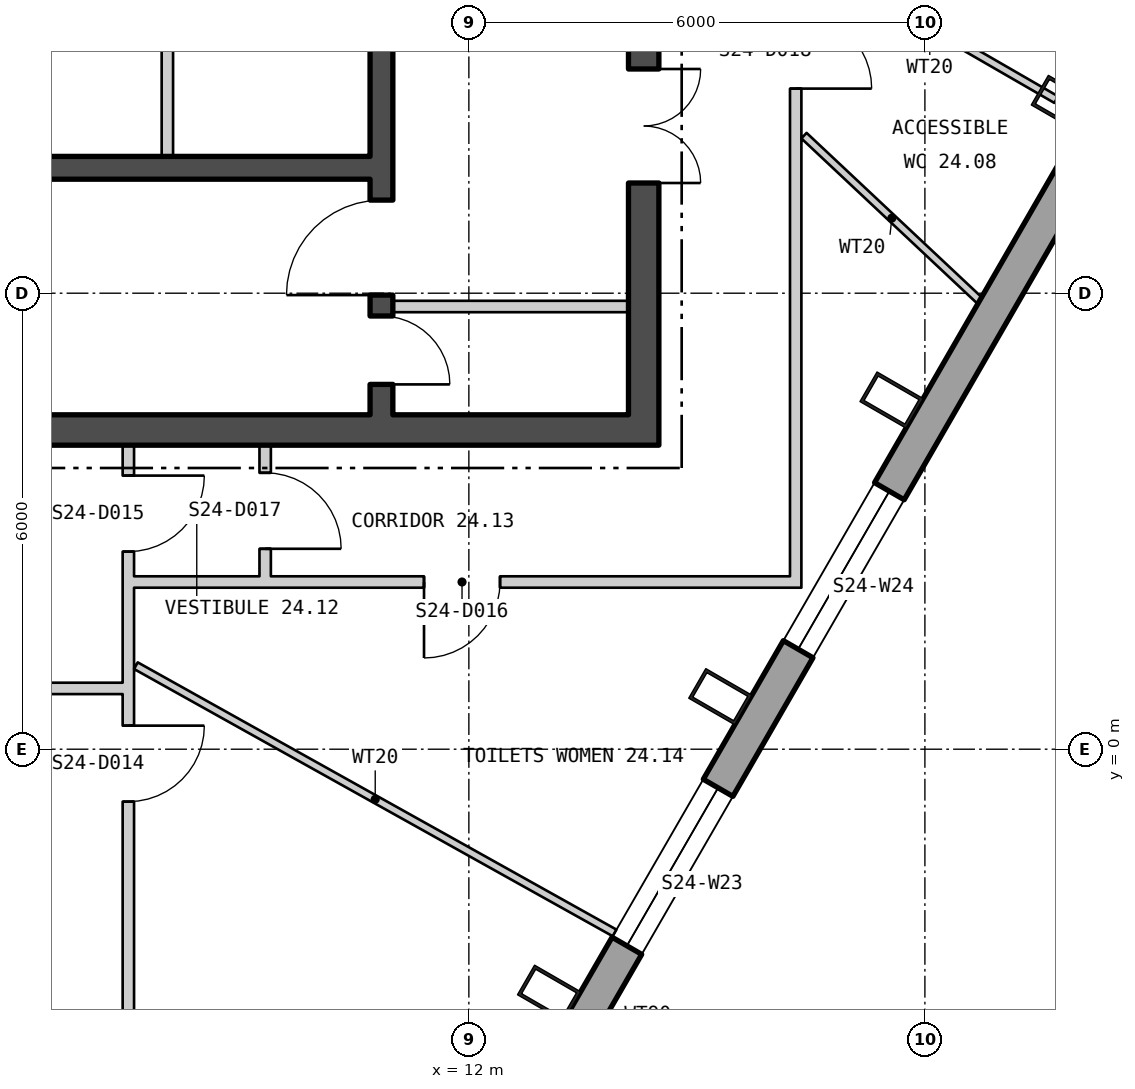
"""IFC4 building model, lengths in metres.
Left out: names, types, materials, properties, quantities, classifications, styles, units other than length and angle.
Written with IfcOpenShell. Run it as: python <this file> out.ifc"""

import sys

from ifc_helpers import new_model, si_unit, direction, frame, frame_2d, origin, origin_2d, place, context, subcontext, project, spatial, polyline, rectangle, hollow_rectangle, outline, extrude, element, fill, save


model = new_model("IFC4")
c1 = context("Model", 3, precision=1e-05, world=origin(), true_north=direction((0.0, 1.0)))
c2 = subcontext(c1, "Body", "Model", "MODEL_VIEW")
j1 = project(units=[si_unit("LENGTHUNIT", "METRE"), si_unit("PLANEANGLEUNIT", "RADIAN")], contexts=[c1])
p1 = place(None, origin())
s1 = spatial("IfcSite", under=j1, at=p1, CompositionType="ELEMENT")
p2 = place(p1, origin())
s2 = spatial("IfcBuilding", under=s1, at=p2, CompositionType="ELEMENT")
p3 = place(p2, frame((0.0, 0.0, 312.6)))
s3 = spatial("IfcBuildingStorey", under=s2, at=p3, CompositionType="ELEMENT", Elevation=312.6)
for number, where, z_axis, x_axis in (
    (1, (13.055, -3.211, 0.0), (0.0, 0.0, 1.0), (0.5, 0.866, 0.0)),
    (2, (15.308, 0.691, 0.0), (0.0, 0.0, 1.0), (0.5, 0.866, 0.0)),
    (3, (17.561, 4.594, 0.0), (0.0, 0.0, 1.0), (0.5, 0.866, 0.0)),
    (4, (19.815, 8.497, 0.0), (0.0, 0.0, 1.0), (0.5, 0.866, 0.0)),
):
    element("IfcColumn", number, at=place(p3, frame(where, z_axis=z_axis, x_axis=x_axis)), inside=s3, PredefinedType="COLUMN", context=c2, shape_type="SweptSolid", body=[
        extrude(hollow_rectangle(XDim=0.45, YDim=0.7, WallThickness=0.04, at=origin_2d()), origin(), (0.0, 0.0, 1.0), 4.2),
    ])
p4 = place(p3, frame((2.12, -23.301, -0.18), z_axis=(0.0, 0.0, 1.0), x_axis=(0.500000141277, 0.866025322218, 0.0)))
e5 = element("IfcWall", 5, at=p4, inside=s3, PredefinedType="SOLIDWALL", context=c2, shape_type="SweptSolid", body=[
    extrude(outline(polyline([(-0.13, -0.225), (45.86, -0.225), (45.6, 0.225), (0.13, 0.225), (-0.13, -0.225)])), origin(), (0.0, 0.0, 1.0), 3.98),
])
p5 = place(p4, frame((1.424, 0.0, 1.08)))
e6 = element("IfcOpeningElement", 6, at=p5, cuts=e5, PredefinedType="OPENING", context=c2, shape_type="SweptSolid", body=[
    extrude(rectangle(XDim=2.4, YDim=2.3, at=frame_2d((1.2, 1.15))), frame((0.0, 0.235, 0.0), z_axis=(0.0, -1.0, 0.0), x_axis=(1.0, 0.0, 0.0)), (0.0, 0.0, 1.0), 0.47),
])
p6 = place(p4, frame((5.892, 0.0, 1.08)))
e7 = element("IfcOpeningElement", 7, at=p6, cuts=e5, PredefinedType="OPENING", context=c2, shape_type="SweptSolid", body=[
    extrude(rectangle(XDim=2.4, YDim=2.3, at=frame_2d((1.2, 1.15))), frame((0.0, 0.235, 0.0), z_axis=(0.0, -1.0, 0.0), x_axis=(1.0, 0.0, 0.0)), (0.0, 0.0, 1.0), 0.47),
])
p7 = place(p4, frame((14.905, 0.0, 1.08)))
e8 = element("IfcOpeningElement", 8, at=p7, cuts=e5, PredefinedType="OPENING", context=c2, shape_type="SweptSolid", body=[
    extrude(rectangle(XDim=2.4, YDim=2.3, at=frame_2d((1.2, 1.15))), frame((0.0, 0.235, 0.0), z_axis=(0.0, -1.0, 0.0), x_axis=(1.0, 0.0, 0.0)), (0.0, 0.0, 1.0), 0.47),
])
p8 = place(p4, frame((19.412, 0.0, 1.08)))
e9 = element("IfcOpeningElement", 9, at=p8, cuts=e5, PredefinedType="OPENING", context=c2, shape_type="SweptSolid", body=[
    extrude(rectangle(XDim=2.4, YDim=2.3, at=frame_2d((1.2, 1.15))), frame((0.0, 0.235, 0.0), z_axis=(0.0, -1.0, 0.0), x_axis=(1.0, 0.0, 0.0)), (0.0, 0.0, 1.0), 0.47),
])
p9 = place(p4, frame((23.918, 0.0, 1.08)))
e10 = element("IfcOpeningElement", 10, at=p9, cuts=e5, PredefinedType="OPENING", context=c2, shape_type="SweptSolid", body=[
    extrude(rectangle(XDim=2.4, YDim=2.3, at=frame_2d((1.2, 1.15))), frame((0.0, 0.235, 0.0), z_axis=(0.0, -1.0, 0.0), x_axis=(1.0, 0.0, 0.0)), (0.0, 0.0, 1.0), 0.47),
])
p10 = place(p4, frame((28.425, 0.0, 1.08)))
e11 = element("IfcOpeningElement", 11, at=p10, cuts=e5, PredefinedType="OPENING", context=c2, shape_type="SweptSolid", body=[
    extrude(rectangle(XDim=2.4, YDim=2.3, at=frame_2d((1.2, 1.15))), frame((0.0, 0.235, 0.0), z_axis=(0.0, -1.0, 0.0), x_axis=(1.0, 0.0, 0.0)), (0.0, 0.0, 1.0), 0.47),
])
p11 = place(p4, frame((37.438, 0.0, 1.08)))
e12 = element("IfcOpeningElement", 12, at=p11, cuts=e5, PredefinedType="OPENING", context=c2, shape_type="SweptSolid", body=[
    extrude(rectangle(XDim=2.4, YDim=2.3, at=frame_2d((1.2, 1.15))), frame((0.0, 0.235, 0.0), z_axis=(0.0, -1.0, 0.0), x_axis=(1.0, 0.0, 0.0)), (0.0, 0.0, 1.0), 0.47),
])
p12 = place(p4, frame((41.907, 0.0, 1.08)))
e13 = element("IfcOpeningElement", 13, at=p12, cuts=e5, PredefinedType="OPENING", context=c2, shape_type="SweptSolid", body=[
    extrude(rectangle(XDim=2.4, YDim=2.3, at=frame_2d((1.2, 1.15))), frame((0.0, 0.235, 0.0), z_axis=(0.0, -1.0, 0.0), x_axis=(1.0, 0.0, 0.0)), (0.0, 0.0, 1.0), 0.47),
])
p13 = place(p3, frame((-14.5, 4.2, 0.0), z_axis=(0.0, 0.0, 1.0), x_axis=(1.0, 0.0, 0.0)))
e14 = element("IfcWall", 14, at=p13, inside=s3, PredefinedType="SHEAR", context=c2, shape_type="SweptSolid", body=[
    extrude(rectangle(XDim=29.0, YDim=0.4, at=frame_2d((14.5, 0.0))), origin(), (0.0, 0.0, 1.0), 4.0),
])
p14 = place(p13, frame((9.0, 0.0, 0.0)))
e15 = element("IfcOpeningElement", 15, at=p14, cuts=e14, PredefinedType="OPENING", context=c2, shape_type="SweptSolid", body=[
    extrude(rectangle(XDim=1.8, YDim=2.4, at=frame_2d((0.9, 1.2))), frame((0.0, 0.21, 0.0), z_axis=(0.0, -1.0, 0.0), x_axis=(1.0, 0.0, 0.0)), (0.0, 0.0, 1.0), 0.42),
])
p15 = place(p13, frame((19.0, 0.0, 0.0)))
e16 = element("IfcOpeningElement", 16, at=p15, cuts=e14, PredefinedType="OPENING", context=c2, shape_type="SweptSolid", body=[
    extrude(rectangle(XDim=1.8, YDim=2.4, at=frame_2d((0.9, 1.2))), frame((0.0, 0.21, 0.0), z_axis=(0.0, -1.0, 0.0), x_axis=(1.0, 0.0, 0.0)), (0.0, 0.0, 1.0), 0.42),
])
p16 = place(p3, frame((14.3, 4.4, 0.0), z_axis=(0.0, 0.0, 1.0), x_axis=(0.0, 1.0, 0.0)))
e17 = element("IfcWall", 17, at=p16, inside=s3, PredefinedType="SHEAR", context=c2, shape_type="SweptSolid", body=[
    extrude(rectangle(XDim=13.2, YDim=0.4, at=frame_2d((6.6, 0.0))), origin(), (0.0, 0.0, 1.0), 4.0),
])
p17 = place(p16, frame((3.05, 0.0, 0.0)))
e18 = element("IfcOpeningElement", 18, at=p17, cuts=e17, PredefinedType="OPENING", context=c2, shape_type="SweptSolid", body=[
    extrude(rectangle(XDim=1.5, YDim=2.1, at=frame_2d((0.75, 1.05))), frame((0.0, 0.21, 0.0), z_axis=(0.0, -1.0, 0.0), x_axis=(1.0, 0.0, 0.0)), (0.0, 0.0, 1.0), 0.42),
])
p18 = place(p3, frame((10.85, 4.4, 0.0), z_axis=(0.0, 0.0, 1.0), x_axis=(0.0, 1.0, 0.0)))
e19 = element("IfcWall", 19, at=p18, inside=s3, PredefinedType="SHEAR", context=c2, shape_type="SweptSolid", body=[
    extrude(rectangle(XDim=13.2, YDim=0.3, at=frame_2d((6.6, 0.0))), origin(), (0.0, 0.0, 1.0), 4.0),
])
p19 = place(p18, frame((1.575, 0.0, 0.0)))
e20 = element("IfcOpeningElement", 20, at=p19, cuts=e19, PredefinedType="OPENING", context=c2, shape_type="SweptSolid", body=[
    extrude(rectangle(XDim=1.25, YDim=2.1, at=frame_2d((0.625, 1.05))), frame((0.0, 0.16, 0.0), z_axis=(0.0, -1.0, 0.0), x_axis=(1.0, 0.0, 0.0)), (0.0, 0.0, 1.0), 0.32),
])
p20 = place(p18, frame((0.4, 0.0, 0.0)))
e21 = element("IfcOpeningElement", 21, at=p20, cuts=e19, PredefinedType="OPENING", context=c2, shape_type="SweptSolid", body=[
    extrude(rectangle(XDim=0.9, YDim=2.1, at=frame_2d((0.45, 1.05))), frame((0.0, 0.16, 0.0), z_axis=(0.0, -1.0, 0.0), x_axis=(1.0, 0.0, 0.0)), (0.0, 0.0, 1.0), 0.32),
])
p21 = place(p3, frame((2.6, 7.65, 0.0), z_axis=(0.0, 0.0, 1.0), x_axis=(1.0, 0.0, 0.0)))
e22 = element("IfcWall", 22, at=p21, inside=s3, PredefinedType="SHEAR", context=c2, shape_type="SweptSolid", body=[
    extrude(rectangle(XDim=8.1, YDim=0.3, at=frame_2d((4.05, 0.0))), origin(), (0.0, 0.0, 1.0), 4.0),
])
p22 = place(p3, frame((8.033, 7.8, 0.0), z_axis=(0.0, 0.0, 1.0), x_axis=(0.0, 1.0, 0.0)))
e23 = element("IfcWall", 23, at=p22, inside=s3, PredefinedType="PARTITIONING", context=c2, shape_type="SweptSolid", body=[
    extrude(rectangle(XDim=2.7, YDim=0.15, at=frame_2d((1.35, 0.0))), origin(), (0.0, 0.0, 1.0), 4.0),
])
p23 = place(p3, frame((11.0, 5.825, 0.0), z_axis=(0.0, 0.0, 1.0), x_axis=(1.0, 0.0, 0.0)))
e24 = element("IfcWall", 24, at=p23, inside=s3, PredefinedType="PARTITIONING", context=c2, shape_type="SweptSolid", body=[
    extrude(rectangle(XDim=3.1, YDim=0.15, at=frame_2d((1.55, 0.0))), origin(), (0.0, 0.0, 1.0), 4.0),
])
p24 = place(p3, frame((-7.52, 0.8, 0.0), z_axis=(0.0, 0.0, 1.0), x_axis=(1.0, 0.0, 0.0)))
e25 = element("IfcWall", 25, at=p24, inside=s3, PredefinedType="PARTITIONING", context=c2, shape_type="SweptSolid", body=[
    extrude(rectangle(XDim=14.965, YDim=0.15, at=frame_2d((7.482, 0.0))), origin(), (0.0, 0.0, 1.0), 4.0),
])
p25 = place(p24, frame((1.206, 0.0, 0.0)))
e26 = element("IfcOpeningElement", 26, at=p25, cuts=e25, PredefinedType="OPENING", context=c2, shape_type="SweptSolid", body=[
    extrude(rectangle(XDim=1.0, YDim=2.1, at=frame_2d((0.5, 1.05))), frame((0.0, 0.085, 0.0), z_axis=(0.0, -1.0, 0.0), x_axis=(1.0, 0.0, 0.0)), (0.0, 0.0, 1.0), 0.17),
])
p26 = place(p24, frame((12.796, 0.0, 0.0)))
e27 = element("IfcOpeningElement", 27, at=p26, cuts=e25, PredefinedType="OPENING", context=c2, shape_type="SweptSolid", body=[
    extrude(rectangle(XDim=1.0, YDim=2.1, at=frame_2d((0.5, 1.05))), frame((0.0, 0.085, 0.0), z_axis=(0.0, -1.0, 0.0), x_axis=(1.0, 0.0, 0.0)), (0.0, 0.0, 1.0), 0.17),
])
p27 = place(p3, frame((7.52, -13.498, 0.0), z_axis=(0.0, 0.0, 1.0), x_axis=(0.0, 1.0, 0.0)))
e28 = element("IfcWall", 28, at=p27, inside=s3, PredefinedType="PARTITIONING", context=c2, shape_type="SweptSolid", body=[
    extrude(rectangle(XDim=17.498, YDim=0.15, at=frame_2d((8.749, 0.0))), origin(), (0.0, 0.0, 1.0), 4.0),
])
p28 = place(p27, frame((3.639, 0.0, 0.0)))
e29 = element("IfcOpeningElement", 29, at=p28, cuts=e28, PredefinedType="OPENING", context=c2, shape_type="SweptSolid", body=[
    extrude(rectangle(XDim=1.0, YDim=2.1, at=frame_2d((0.5, 1.05))), frame((0.0, 0.085, 0.0), z_axis=(0.0, -1.0, 0.0), x_axis=(1.0, 0.0, 0.0)), (0.0, 0.0, 1.0), 0.17),
])
p29 = place(p27, frame((12.808, 0.0, 0.0)))
e30 = element("IfcOpeningElement", 30, at=p29, cuts=e28, PredefinedType="OPENING", context=c2, shape_type="SweptSolid", body=[
    extrude(rectangle(XDim=1.0, YDim=2.1, at=frame_2d((0.5, 1.05))), frame((0.0, 0.085, 0.0), z_axis=(0.0, -1.0, 0.0), x_axis=(1.0, 0.0, 0.0)), (0.0, 0.0, 1.0), 0.17),
])
p30 = place(p27, frame((16.098, 0.0, 0.0)))
e31 = element("IfcOpeningElement", 31, at=p30, cuts=e28, PredefinedType="OPENING", context=c2, shape_type="SweptSolid", body=[
    extrude(rectangle(XDim=1.0, YDim=2.1, at=frame_2d((0.5, 1.05))), frame((0.0, 0.085, 0.0), z_axis=(0.0, -1.0, 0.0), x_axis=(1.0, 0.0, 0.0)), (0.0, 0.0, 1.0), 0.17),
])
p31 = place(p3, frame((7.595, 2.2, 0.0), z_axis=(0.0, 0.0, 1.0), x_axis=(1.0, 0.0, 0.0)))
e32 = element("IfcWall", 32, at=p31, inside=s3, PredefinedType="PARTITIONING", context=c2, shape_type="SweptSolid", body=[
    extrude(rectangle(XDim=8.63, YDim=0.15, at=frame_2d((4.315, 0.0))), origin(), (0.0, 0.0, 1.0), 4.0),
])
p32 = place(p31, frame((3.815, 0.0, 0.0)))
e33 = element("IfcOpeningElement", 33, at=p32, cuts=e32, PredefinedType="OPENING", context=c2, shape_type="SweptSolid", body=[
    extrude(rectangle(XDim=1.0, YDim=2.1, at=frame_2d((0.5, 1.05))), frame((0.0, 0.085, 0.0), z_axis=(0.0, -1.0, 0.0), x_axis=(1.0, 0.0, 0.0)), (0.0, 0.0, 1.0), 0.17),
])
p33 = place(p3, frame((7.619, 1.099, 0.0), z_axis=(0.0, 0.0, 1.0), x_axis=(0.873148302033, -0.487454657026, 0.0)))
e34 = element("IfcWall", 34, at=p33, inside=s3, PredefinedType="PARTITIONING", context=c2, shape_type="SweptSolid", body=[
    extrude(rectangle(XDim=7.213, YDim=0.1, at=frame_2d((3.607, 0.0))), origin(), (0.0, 0.0, 1.0), 4.0),
])
p34 = place(p3, frame((9.32, 2.275, 0.0), z_axis=(0.0, 0.0, 1.0), x_axis=(0.0, 1.0, 0.0)))
e35 = element("IfcWall", 35, at=p34, inside=s3, PredefinedType="PARTITIONING", context=c2, shape_type="SweptSolid", body=[
    extrude(rectangle(XDim=1.725, YDim=0.15, at=frame_2d((0.863, 0.0))), origin(), (0.0, 0.0, 1.0), 4.0),
])
p35 = place(p34, frame((0.362, 0.0, 0.0)))
e36 = element("IfcOpeningElement", 36, at=p35, cuts=e35, PredefinedType="OPENING", context=c2, shape_type="SweptSolid", body=[
    extrude(rectangle(XDim=1.0, YDim=2.1, at=frame_2d((0.5, 1.05))), frame((0.0, 0.085, 0.0), z_axis=(0.0, -1.0, 0.0), x_axis=(1.0, 0.0, 0.0)), (0.0, 0.0, 1.0), 0.17),
])
p36 = place(p3, frame((16.3, 2.125, 0.0), z_axis=(0.0, 0.0, 1.0), x_axis=(0.0, 1.0, 0.0)))
e37 = element("IfcWall", 37, at=p36, inside=s3, PredefinedType="PARTITIONING", context=c2, shape_type="SweptSolid", body=[
    extrude(rectangle(XDim=17.623, YDim=0.15, at=frame_2d((8.812, 0.0))), origin(), (0.0, 0.0, 1.0), 4.0),
])
p37 = place(p36, frame((6.567, 0.0, 0.0)))
e38 = element("IfcOpeningElement", 38, at=p37, cuts=e37, PredefinedType="OPENING", context=c2, shape_type="SweptSolid", body=[
    extrude(rectangle(XDim=1.0, YDim=2.1, at=frame_2d((0.5, 1.05))), frame((0.0, 0.085, 0.0), z_axis=(0.0, -1.0, 0.0), x_axis=(1.0, 0.0, 0.0)), (0.0, 0.0, 1.0), 0.17),
])
p38 = place(p36, frame((9.506, 0.0, 0.0)))
e39 = element("IfcOpeningElement", 39, at=p38, cuts=e37, PredefinedType="OPENING", context=c2, shape_type="SweptSolid", body=[
    extrude(rectangle(XDim=1.0, YDim=2.1, at=frame_2d((0.5, 1.05))), frame((0.0, 0.085, 0.0), z_axis=(0.0, -1.0, 0.0), x_axis=(1.0, 0.0, 0.0)), (0.0, 0.0, 1.0), 0.17),
])
p39 = place(p36, frame((14.018, 0.0, 0.0)))
e40 = element("IfcOpeningElement", 40, at=p39, cuts=e37, PredefinedType="OPENING", context=c2, shape_type="SweptSolid", body=[
    extrude(rectangle(XDim=1.0, YDim=2.1, at=frame_2d((0.5, 1.05))), frame((0.0, 0.085, 0.0), z_axis=(0.0, -1.0, 0.0), x_axis=(1.0, 0.0, 0.0)), (0.0, 0.0, 1.0), 0.17),
])
p40 = place(p3, frame((16.4, 10.468, 0.0), z_axis=(0.0, 0.0, 1.0), x_axis=(0.866072919292, -0.499917691695, 0.0)))
e41 = element("IfcWall", 41, at=p40, inside=s3, PredefinedType="PARTITIONING", context=c2, shape_type="SweptSolid", body=[
    extrude(rectangle(XDim=3.843, YDim=0.1, at=frame_2d((1.921, 0.0))), origin(), (0.0, 0.0, 1.0), 4.0),
])
p41 = place(p3, frame((16.409, 8.073, 0.0), z_axis=(0.0, 0.0, 1.0), x_axis=(0.729143686078, -0.684360639614, 0.0)))
e42 = element("IfcWall", 42, at=p41, inside=s3, PredefinedType="PARTITIONING", context=c2, shape_type="SweptSolid", body=[
    extrude(rectangle(XDim=3.171, YDim=0.1, at=frame_2d((1.585, 0.0))), origin(), (0.0, 0.0, 1.0), 4.0),
])
p42 = place(p9, origin())
e43 = element("IfcWindow", 43, at=p42, inside=s3, PartitioningType="SINGLE_PANEL", PredefinedType="WINDOW", context=c2, shape_type="SweptSolid", body=[
    extrude(rectangle(XDim=2.4, YDim=2.3, at=frame_2d((1.2, 1.15))), frame((0.0, 0.105, 0.0), z_axis=(0.0, -1.0, 0.0), x_axis=(1.0, 0.0, 0.0)), (0.0, 0.0, 1.0), 0.06),
])
fill(e10, e43)
p43 = place(p10, origin())
e44 = element("IfcWindow", 44, at=p43, inside=s3, PartitioningType="SINGLE_PANEL", PredefinedType="WINDOW", context=c2, shape_type="SweptSolid", body=[
    extrude(rectangle(XDim=2.4, YDim=2.3, at=frame_2d((1.2, 1.15))), frame((0.0, 0.105, 0.0), z_axis=(0.0, -1.0, 0.0), x_axis=(1.0, 0.0, 0.0)), (0.0, 0.0, 1.0), 0.06),
])
fill(e11, e44)
p44 = place(p19, origin())
e45 = element("IfcDoor", 45, at=p44, inside=s3, OperationType="SINGLE_SWING_RIGHT", PredefinedType="DOOR", context=c2, shape_type="SweptSolid", body=[
    extrude(rectangle(XDim=1.25, YDim=2.1, at=frame_2d((0.625, 1.05))), frame((0.0, 0.025, 0.0), z_axis=(0.0, -1.0, 0.0), x_axis=(1.0, 0.0, 0.0)), (0.0, 0.0, 1.0), 0.05),
])
fill(e20, e45)
p45 = place(p17, origin())
e46 = element("IfcDoor", 46, at=p45, inside=s3, OperationType="DOUBLE_DOOR_SINGLE_SWING", PredefinedType="DOOR", context=c2, shape_type="SweptSolid", body=[
    extrude(rectangle(XDim=1.5, YDim=2.1, at=frame_2d((0.75, 1.05))), frame((0.0, 0.025, 0.0), z_axis=(0.0, -1.0, 0.0), x_axis=(1.0, 0.0, 0.0)), (0.0, 0.0, 1.0), 0.05),
])
fill(e18, e46)
p46 = place(p20, origin())
e47 = element("IfcDoor", 47, at=p46, inside=s3, OperationType="SINGLE_SWING_LEFT", PredefinedType="DOOR", context=c2, shape_type="SweptSolid", body=[
    extrude(rectangle(XDim=0.9, YDim=2.1, at=frame_2d((0.45, 1.05))), frame((0.0, 0.025, 0.0), z_axis=(0.0, -1.0, 0.0), x_axis=(1.0, 0.0, 0.0)), (0.0, 0.0, 1.0), 0.05),
])
fill(e21, e47)
p47 = place(p29, origin())
e48 = element("IfcDoor", 48, at=p47, inside=s3, OperationType="SINGLE_SWING_RIGHT", PredefinedType="DOOR", context=c2, shape_type="SweptSolid", body=[
    extrude(rectangle(XDim=1.0, YDim=2.1, at=frame_2d((0.5, 1.05))), frame((0.0, 0.025, 0.0), z_axis=(0.0, -1.0, 0.0), x_axis=(1.0, 0.0, 0.0)), (0.0, 0.0, 1.0), 0.05),
])
fill(e30, e48)
p48 = place(p30, origin())
e49 = element("IfcDoor", 49, at=p48, inside=s3, OperationType="SINGLE_SWING_RIGHT", PredefinedType="DOOR", context=c2, shape_type="SweptSolid", body=[
    extrude(rectangle(XDim=1.0, YDim=2.1, at=frame_2d((0.5, 1.05))), frame((0.0, 0.025, 0.0), z_axis=(0.0, -1.0, 0.0), x_axis=(1.0, 0.0, 0.0)), (0.0, 0.0, 1.0), 0.05),
])
fill(e31, e49)
p49 = place(p32, origin())
e50 = element("IfcDoor", 50, at=p49, inside=s3, OperationType="SINGLE_SWING_LEFT", PredefinedType="DOOR", context=c2, shape_type="SweptSolid", body=[
    extrude(rectangle(XDim=1.0, YDim=2.1, at=frame_2d((0.5, 1.05))), frame((0.0, 0.025, 0.0), z_axis=(0.0, -1.0, 0.0), x_axis=(1.0, 0.0, 0.0)), (0.0, 0.0, 1.0), 0.05),
])
fill(e33, e50)
p50 = place(p35, origin())
e51 = element("IfcDoor", 51, at=p50, inside=s3, OperationType="SINGLE_SWING_LEFT", PredefinedType="DOOR", context=c2, shape_type="SweptSolid", body=[
    extrude(rectangle(XDim=1.0, YDim=2.1, at=frame_2d((0.5, 1.05))), frame((0.0, 0.025, 0.0), z_axis=(0.0, -1.0, 0.0), x_axis=(1.0, 0.0, 0.0)), (0.0, 0.0, 1.0), 0.05),
])
fill(e36, e51)
p51 = place(p37, origin())
e52 = element("IfcDoor", 52, at=p51, inside=s3, OperationType="SINGLE_SWING_LEFT", PredefinedType="DOOR", context=c2, shape_type="SweptSolid", body=[
    extrude(rectangle(XDim=1.0, YDim=2.1, at=frame_2d((0.5, 1.05))), frame((0.0, 0.025, 0.0), z_axis=(0.0, -1.0, 0.0), x_axis=(1.0, 0.0, 0.0)), (0.0, 0.0, 1.0), 0.05),
])
fill(e38, e52)
save(model, sys.argv[1])
